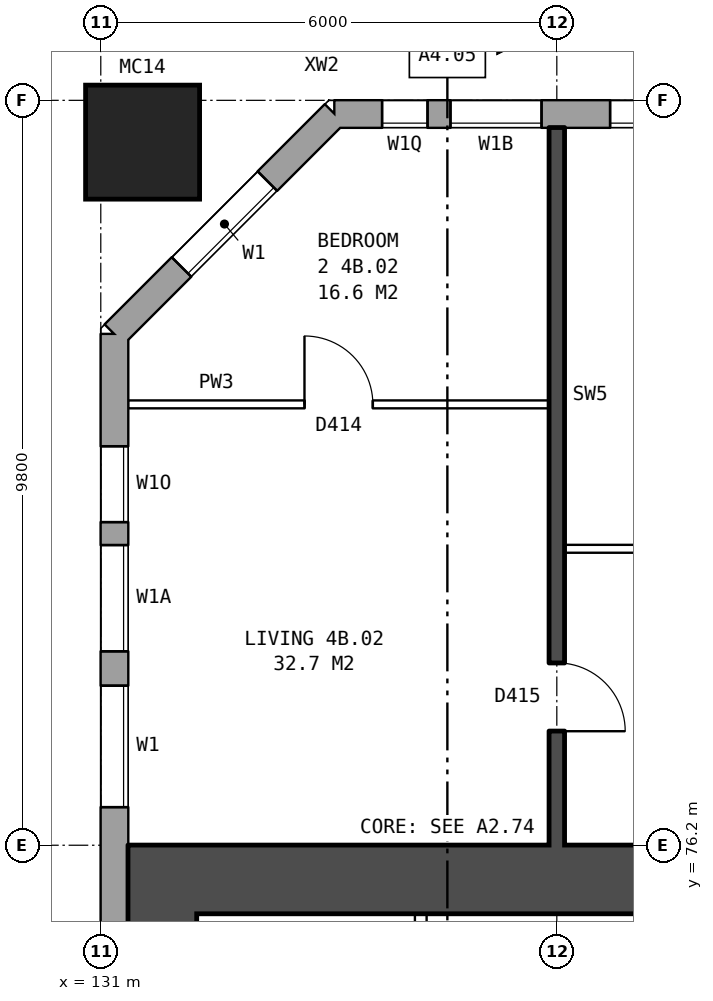
"""IFC4 building model, lengths in metres.
Left out: names, types, materials, properties, quantities, classifications, styles, units other than length and angle.
Written with IfcOpenShell. Run it as: python <this file> out.ifc"""

import sys

from ifc_helpers import new_model, si_unit, direction, frame, frame_2d, origin, origin_2d, place, context, subcontext, project, spatial, rectangle, hollow_rectangle, extrude, element, fill, save


model = new_model("IFC4")
c1 = context("Model", 3, precision=1e-05, world=origin(), true_north=direction((0.0, 1.0)))
c2 = subcontext(c1, "Body", "Model", "MODEL_VIEW")
j1 = project(units=[si_unit("LENGTHUNIT", "METRE"), si_unit("PLANEANGLEUNIT", "RADIAN")], contexts=[c1])
p1 = place(None, origin())
s1 = spatial("IfcSite", under=j1, at=p1, CompositionType="ELEMENT")
p2 = place(p1, origin())
s2 = spatial("IfcBuilding", under=s1, at=p2, CompositionType="ELEMENT")
p3 = place(p2, frame((0.0, 0.0, 19.5)))
s3 = spatial("IfcBuildingStorey", under=s2, at=p3, CompositionType="ELEMENT", Elevation=19.5)
p4 = place(p3, frame((131.55, 85.45, 0.0), z_axis=(0.0, 0.0, 1.0), x_axis=(1.0, 0.0, 0.0)))
e1 = element("IfcColumn", 1, at=p4, inside=s3, PredefinedType="COLUMN", context=c2, shape_type="SweptSolid", body=[
    extrude(hollow_rectangle(XDim=1.5, YDim=1.5, WallThickness=0.08, at=origin_2d()), origin(), (0.0, 0.0, 1.0), 3.1),
])
p5 = place(p3, frame((174.675, 85.82, 0.0), z_axis=(0.0, 0.0, 1.0), x_axis=(-1.0, 0.0, 0.0)))
e2 = element("IfcWall", 2, at=p5, inside=s3, PredefinedType="STANDARD", context=c2, shape_type="SweptSolid", body=[
    extrude(rectangle(XDim=40.601, YDim=0.36, at=frame_2d((20.3, 0.0))), origin(), (0.0, 0.0, 1.0), 2.85),
])
p6 = place(p5, frame((2.375, 0.0, 0.8)))
e3 = element("IfcOpeningElement", 3, at=p6, cuts=e2, PredefinedType="OPENING", context=c2, shape_type="SweptSolid", body=[
    extrude(rectangle(XDim=1.6, YDim=1.8, at=frame_2d((0.8, 0.9))), frame((0.0, 0.19, 0.0), z_axis=(0.0, -1.0, 0.0), x_axis=(1.0, 0.0, 0.0)), (0.0, 0.0, 1.0), 0.38),
])
p7 = place(p5, frame((5.375, 0.0, 0.8)))
e4 = element("IfcOpeningElement", 4, at=p7, cuts=e2, PredefinedType="OPENING", context=c2, shape_type="SweptSolid", body=[
    extrude(rectangle(XDim=1.6, YDim=1.8, at=frame_2d((0.8, 0.9))), frame((0.0, 0.19, 0.0), z_axis=(0.0, -1.0, 0.0), x_axis=(1.0, 0.0, 0.0)), (0.0, 0.0, 1.0), 0.38),
])
p8 = place(p5, frame((8.375, 0.0, 0.8)))
e5 = element("IfcOpeningElement", 5, at=p8, cuts=e2, PredefinedType="OPENING", context=c2, shape_type="SweptSolid", body=[
    extrude(rectangle(XDim=1.6, YDim=1.8, at=frame_2d((0.8, 0.9))), frame((0.0, 0.19, 0.0), z_axis=(0.0, -1.0, 0.0), x_axis=(1.0, 0.0, 0.0)), (0.0, 0.0, 1.0), 0.38),
])
p9 = place(p5, frame((11.375, 0.0, 0.8)))
e6 = element("IfcOpeningElement", 6, at=p9, cuts=e2, PredefinedType="OPENING", context=c2, shape_type="SweptSolid", body=[
    extrude(rectangle(XDim=1.6, YDim=1.8, at=frame_2d((0.8, 0.9))), frame((0.0, 0.19, 0.0), z_axis=(0.0, -1.0, 0.0), x_axis=(1.0, 0.0, 0.0)), (0.0, 0.0, 1.0), 0.38),
])
p10 = place(p5, frame((14.375, 0.0, 0.8)))
e7 = element("IfcOpeningElement", 7, at=p10, cuts=e2, PredefinedType="OPENING", context=c2, shape_type="SweptSolid", body=[
    extrude(rectangle(XDim=1.6, YDim=1.8, at=frame_2d((0.8, 0.9))), frame((0.0, 0.19, 0.0), z_axis=(0.0, -1.0, 0.0), x_axis=(1.0, 0.0, 0.0)), (0.0, 0.0, 1.0), 0.38),
])
p11 = place(p5, frame((17.375, 0.0, 0.8)))
e8 = element("IfcOpeningElement", 8, at=p11, cuts=e2, PredefinedType="OPENING", context=c2, shape_type="SweptSolid", body=[
    extrude(rectangle(XDim=1.6, YDim=1.8, at=frame_2d((0.8, 0.9))), frame((0.0, 0.19, 0.0), z_axis=(0.0, -1.0, 0.0), x_axis=(1.0, 0.0, 0.0)), (0.0, 0.0, 1.0), 0.38),
])
p12 = place(p5, frame((20.375, 0.0, 0.8)))
e9 = element("IfcOpeningElement", 9, at=p12, cuts=e2, PredefinedType="OPENING", context=c2, shape_type="SweptSolid", body=[
    extrude(rectangle(XDim=1.6, YDim=1.8, at=frame_2d((0.8, 0.9))), frame((0.0, 0.19, 0.0), z_axis=(0.0, -1.0, 0.0), x_axis=(1.0, 0.0, 0.0)), (0.0, 0.0, 1.0), 0.38),
])
p13 = place(p5, frame((23.375, 0.0, 0.8)))
e10 = element("IfcOpeningElement", 10, at=p13, cuts=e2, PredefinedType="OPENING", context=c2, shape_type="SweptSolid", body=[
    extrude(rectangle(XDim=1.6, YDim=1.8, at=frame_2d((0.8, 0.9))), frame((0.0, 0.19, 0.0), z_axis=(0.0, -1.0, 0.0), x_axis=(1.0, 0.0, 0.0)), (0.0, 0.0, 1.0), 0.38),
])
p14 = place(p5, frame((26.375, 0.0, 0.8)))
e11 = element("IfcOpeningElement", 11, at=p14, cuts=e2, PredefinedType="OPENING", context=c2, shape_type="SweptSolid", body=[
    extrude(rectangle(XDim=1.6, YDim=1.8, at=frame_2d((0.8, 0.9))), frame((0.0, 0.19, 0.0), z_axis=(0.0, -1.0, 0.0), x_axis=(1.0, 0.0, 0.0)), (0.0, 0.0, 1.0), 0.38),
])
p15 = place(p5, frame((29.375, 0.0, 0.8)))
e12 = element("IfcOpeningElement", 12, at=p15, cuts=e2, PredefinedType="OPENING", context=c2, shape_type="SweptSolid", body=[
    extrude(rectangle(XDim=1.6, YDim=1.8, at=frame_2d((0.8, 0.9))), frame((0.0, 0.19, 0.0), z_axis=(0.0, -1.0, 0.0), x_axis=(1.0, 0.0, 0.0)), (0.0, 0.0, 1.0), 0.38),
])
p16 = place(p5, frame((32.375, 0.0, 0.8)))
e13 = element("IfcOpeningElement", 13, at=p16, cuts=e2, PredefinedType="OPENING", context=c2, shape_type="SweptSolid", body=[
    extrude(rectangle(XDim=1.6, YDim=1.8, at=frame_2d((0.8, 0.9))), frame((0.0, 0.19, 0.0), z_axis=(0.0, -1.0, 0.0), x_axis=(1.0, 0.0, 0.0)), (0.0, 0.0, 1.0), 0.38),
])
p17 = place(p5, frame((35.375, 0.0, 0.8)))
e14 = element("IfcOpeningElement", 14, at=p17, cuts=e2, PredefinedType="OPENING", context=c2, shape_type="SweptSolid", body=[
    extrude(rectangle(XDim=1.6, YDim=1.8, at=frame_2d((0.8, 0.9))), frame((0.0, 0.19, 0.0), z_axis=(0.0, -1.0, 0.0), x_axis=(1.0, 0.0, 0.0)), (0.0, 0.0, 1.0), 0.38),
])
p18 = place(p5, frame((37.875, 0.0, 0.8)))
e15 = element("IfcOpeningElement", 15, at=p18, cuts=e2, PredefinedType="OPENING", context=c2, shape_type="SweptSolid", body=[
    extrude(rectangle(XDim=1.2, YDim=1.8, at=frame_2d((0.6, 0.9))), frame((0.0, 0.19, 0.0), z_axis=(0.0, -1.0, 0.0), x_axis=(1.0, 0.0, 0.0)), (0.0, 0.0, 1.0), 0.38),
])
p19 = place(p5, frame((39.375, 0.0, 0.8)))
e16 = element("IfcOpeningElement", 16, at=p19, cuts=e2, PredefinedType="OPENING", context=c2, shape_type="SweptSolid", body=[
    extrude(rectangle(XDim=0.6, YDim=1.2, at=frame_2d((0.3, 0.6))), frame((0.0, 0.19, 0.0), z_axis=(0.0, -1.0, 0.0), x_axis=(1.0, 0.0, 0.0)), (0.0, 0.0, 1.0), 0.38),
])
p20 = place(p3, frame((134.075, 85.82, 0.0), z_axis=(0.0, 0.0, 1.0), x_axis=(-0.707106781187, -0.707106781187, 0.0)))
e17 = element("IfcWall", 17, at=p20, inside=s3, PredefinedType="STANDARD", context=c2, shape_type="SweptSolid", body=[
    extrude(rectangle(XDim=4.094, YDim=0.36, at=frame_2d((2.047, 0.0))), origin(), (0.0, 0.0, 1.0), 2.85),
])
p21 = place(p20, frame((1.247, 0.0, 0.8)))
e18 = element("IfcOpeningElement", 18, at=p21, cuts=e17, PredefinedType="OPENING", context=c2, shape_type="SweptSolid", body=[
    extrude(rectangle(XDim=1.6, YDim=1.8, at=frame_2d((0.8, 0.9))), frame((0.0, 0.19, 0.0), z_axis=(0.0, -1.0, 0.0), x_axis=(1.0, 0.0, 0.0)), (0.0, 0.0, 1.0), 0.38),
])
p22 = place(p3, frame((131.18, 82.925, 0.0), z_axis=(0.0, 0.0, 1.0), x_axis=(0.0, -1.0, 0.0)))
e19 = element("IfcWall", 19, at=p22, inside=s3, PredefinedType="STANDARD", context=c2, shape_type="SweptSolid", body=[
    extrude(rectangle(XDim=25.851, YDim=0.36, at=frame_2d((12.925, 0.0))), origin(), (0.0, 0.0, 1.0), 2.85),
])
p23 = place(p22, frame((1.475, 0.0, 0.8)))
e20 = element("IfcOpeningElement", 20, at=p23, cuts=e19, PredefinedType="OPENING", context=c2, shape_type="SweptSolid", body=[
    extrude(rectangle(XDim=1.0, YDim=1.2, at=frame_2d((0.5, 0.6))), frame((0.0, 0.19, 0.0), z_axis=(0.0, -1.0, 0.0), x_axis=(1.0, 0.0, 0.0)), (0.0, 0.0, 1.0), 0.38),
])
p24 = place(p22, frame((4.625, 0.0, 0.8)))
e21 = element("IfcOpeningElement", 21, at=p24, cuts=e19, PredefinedType="OPENING", context=c2, shape_type="SweptSolid", body=[
    extrude(rectangle(XDim=1.6, YDim=1.8, at=frame_2d((0.8, 0.9))), frame((0.0, 0.19, 0.0), z_axis=(0.0, -1.0, 0.0), x_axis=(1.0, 0.0, 0.0)), (0.0, 0.0, 1.0), 0.38),
])
p25 = place(p22, frame((19.625, 0.0, 0.8)))
e22 = element("IfcOpeningElement", 22, at=p25, cuts=e19, PredefinedType="OPENING", context=c2, shape_type="SweptSolid", body=[
    extrude(rectangle(XDim=1.6, YDim=1.8, at=frame_2d((0.8, 0.9))), frame((0.0, 0.19, 0.0), z_axis=(0.0, -1.0, 0.0), x_axis=(1.0, 0.0, 0.0)), (0.0, 0.0, 1.0), 0.38),
])
p26 = place(p22, frame((21.525, 0.0, 0.8)))
e23 = element("IfcOpeningElement", 23, at=p26, cuts=e19, PredefinedType="OPENING", context=c2, shape_type="SweptSolid", body=[
    extrude(rectangle(XDim=1.4, YDim=1.8, at=frame_2d((0.7, 0.9))), frame((0.0, 0.19, 0.0), z_axis=(0.0, -1.0, 0.0), x_axis=(1.0, 0.0, 0.0)), (0.0, 0.0, 1.0), 0.38),
])
p27 = place(p22, frame((2.775, 0.0, 0.8)))
e24 = element("IfcOpeningElement", 24, at=p27, cuts=e19, PredefinedType="OPENING", context=c2, shape_type="SweptSolid", body=[
    extrude(rectangle(XDim=1.4, YDim=1.8, at=frame_2d((0.7, 0.9))), frame((0.0, 0.19, 0.0), z_axis=(0.0, -1.0, 0.0), x_axis=(1.0, 0.0, 0.0)), (0.0, 0.0, 1.0), 0.38),
])
p28 = place(p22, frame((23.225, 0.0, 0.8)))
e25 = element("IfcOpeningElement", 25, at=p28, cuts=e19, PredefinedType="OPENING", context=c2, shape_type="SweptSolid", body=[
    extrude(rectangle(XDim=1.0, YDim=1.2, at=frame_2d((0.5, 0.6))), frame((0.0, 0.19, 0.0), z_axis=(0.0, -1.0, 0.0), x_axis=(1.0, 0.0, 0.0)), (0.0, 0.0, 1.0), 0.38),
])
p29 = place(p3, frame((131.81, 64.7, 0.0), z_axis=(0.0, 0.0, 1.0), x_axis=(0.0, 1.0, 0.0)))
e26 = element("IfcWall", 26, at=p29, inside=s3, PredefinedType="SHEAR", context=c2, shape_type="SweptSolid", body=[
    extrude(rectangle(XDim=10.6, YDim=0.9, at=frame_2d((5.3, 0.0))), origin(), (0.0, 0.0, 1.0), 2.85),
])
p30 = place(p3, frame((139.76, 75.75, 0.0), z_axis=(0.0, 0.0, 1.0), x_axis=(-1.0, 0.0, 0.0)))
e27 = element("IfcWall", 27, at=p30, inside=s3, PredefinedType="SHEAR", context=c2, shape_type="SweptSolid", body=[
    extrude(rectangle(XDim=8.4, YDim=0.9, at=frame_2d((4.2, 0.0))), origin(), (0.0, 0.0, 1.0), 2.85),
])
p31 = place(p3, frame((135.21, 71.45, 0.0), z_axis=(0.0, 0.0, 1.0), x_axis=(0.0, 1.0, 0.0)))
e28 = element("IfcWall", 28, at=p31, inside=s3, PredefinedType="PARTITIONING", context=c2, shape_type="SweptSolid", body=[
    extrude(rectangle(XDim=3.85, YDim=0.15, at=frame_2d((1.925, 0.0))), origin(), (0.0, 0.0, 1.0), 2.85),
])
p32 = place(p31, frame((0.45, 0.0, 0.0)))
e29 = element("IfcOpeningElement", 29, at=p32, cuts=e28, PredefinedType="OPENING", context=c2, shape_type="SweptSolid", body=[
    extrude(rectangle(XDim=1.1, YDim=2.1, at=frame_2d((0.55, 1.05))), frame((0.0, 0.085, 0.0), z_axis=(0.0, -1.0, 0.0), x_axis=(1.0, 0.0, 0.0)), (0.0, 0.0, 1.0), 0.17),
])
p33 = place(p3, frame((137.1, 80.1, 0.0), z_axis=(0.0, 0.0, 1.0), x_axis=(1.0, 0.0, 0.0)))
e30 = element("IfcWall", 30, at=p33, inside=s3, PredefinedType="PARTITIONING", context=c2, shape_type="SweptSolid", body=[
    extrude(rectangle(XDim=5.8, YDim=0.1, at=frame_2d((2.9, 0.0))), origin(), (0.0, 0.0, 1.0), 2.85),
])
p34 = place(p33, frame((1.3, 0.0, 0.0)))
e31 = element("IfcOpeningElement", 31, at=p34, cuts=e30, PredefinedType="OPENING", context=c2, shape_type="SweptSolid", body=[
    extrude(rectangle(XDim=0.9, YDim=2.1, at=frame_2d((0.45, 1.05))), frame((0.0, 0.06, 0.0), z_axis=(0.0, -1.0, 0.0), x_axis=(1.0, 0.0, 0.0)), (0.0, 0.0, 1.0), 0.12),
])
p35 = place(p33, frame((4.2, 0.0, 0.0)))
e32 = element("IfcOpeningElement", 32, at=p35, cuts=e30, PredefinedType="OPENING", context=c2, shape_type="SweptSolid", body=[
    extrude(rectangle(XDim=0.9, YDim=2.1, at=frame_2d((0.45, 1.05))), frame((0.0, 0.06, 0.0), z_axis=(0.0, -1.0, 0.0), x_axis=(1.0, 0.0, 0.0)), (0.0, 0.0, 1.0), 0.12),
])
p36 = place(p3, frame((131.36, 82.0, 0.0), z_axis=(0.0, 0.0, 1.0), x_axis=(1.0, 0.0, 0.0)))
e33 = element("IfcWall", 33, at=p36, inside=s3, PredefinedType="PARTITIONING", context=c2, shape_type="SweptSolid", body=[
    extrude(rectangle(XDim=5.54, YDim=0.1, at=frame_2d((2.77, 0.0))), origin(), (0.0, 0.0, 1.0), 2.85),
])
p37 = place(p36, frame((2.32, 0.0, 0.0)))
e34 = element("IfcOpeningElement", 34, at=p37, cuts=e33, PredefinedType="OPENING", context=c2, shape_type="SweptSolid", body=[
    extrude(rectangle(XDim=0.9, YDim=2.1, at=frame_2d((0.45, 1.05))), frame((0.0, 0.06, 0.0), z_axis=(0.0, -1.0, 0.0), x_axis=(1.0, 0.0, 0.0)), (0.0, 0.0, 1.0), 0.12),
])
p38 = place(p3, frame((137.0, 76.2, 0.0), z_axis=(0.0, 0.0, 1.0), x_axis=(0.0, 1.0, 0.0)))
e35 = element("IfcWall", 35, at=p38, inside=s3, PredefinedType="SOLIDWALL", context=c2, shape_type="SweptSolid", body=[
    extrude(rectangle(XDim=9.44, YDim=0.2, at=frame_2d((4.72, 0.0))), origin(), (0.0, 0.0, 1.0), 2.85),
])
p39 = place(p38, frame((1.5, 0.0, 0.0)))
e36 = element("IfcOpeningElement", 36, at=p39, cuts=e35, PredefinedType="OPENING", context=c2, shape_type="SweptSolid", body=[
    extrude(rectangle(XDim=0.9, YDim=2.1, at=frame_2d((0.45, 1.05))), frame((0.0, 0.11, 0.0), z_axis=(0.0, -1.0, 0.0), x_axis=(1.0, 0.0, 0.0)), (0.0, 0.0, 1.0), 0.22),
])
p40 = place(p17, origin())
e37 = element("IfcWindow", 37, at=p40, inside=s3, PartitioningType="SINGLE_PANEL", PredefinedType="WINDOW", context=c2, shape_type="SweptSolid", body=[
    extrude(rectangle(XDim=1.6, YDim=1.8, at=frame_2d((0.8, 0.9))), frame((0.0, 0.15, 0.0), z_axis=(0.0, -1.0, 0.0), x_axis=(1.0, 0.0, 0.0)), (0.0, 0.0, 1.0), 0.06),
])
fill(e14, e37)
p41 = place(p18, origin())
e38 = element("IfcWindow", 38, at=p41, inside=s3, PartitioningType="SINGLE_PANEL", PredefinedType="WINDOW", context=c2, shape_type="SweptSolid", body=[
    extrude(rectangle(XDim=1.2, YDim=1.8, at=frame_2d((0.6, 0.9))), frame((0.0, 0.15, 0.0), z_axis=(0.0, -1.0, 0.0), x_axis=(1.0, 0.0, 0.0)), (0.0, 0.0, 1.0), 0.06),
])
fill(e15, e38)
p42 = place(p21, origin())
e39 = element("IfcWindow", 39, at=p42, inside=s3, PartitioningType="SINGLE_PANEL", PredefinedType="WINDOW", context=c2, shape_type="SweptSolid", body=[
    extrude(rectangle(XDim=1.6, YDim=1.8, at=frame_2d((0.8, 0.9))), frame((0.0, 0.15, 0.0), z_axis=(0.0, -1.0, 0.0), x_axis=(1.0, 0.0, 0.0)), (0.0, 0.0, 1.0), 0.06),
])
fill(e18, e39)
p43 = place(p23, origin())
e40 = element("IfcWindow", 40, at=p43, inside=s3, PartitioningType="SINGLE_PANEL", PredefinedType="WINDOW", context=c2, shape_type="SweptSolid", body=[
    extrude(rectangle(XDim=1.0, YDim=1.2, at=frame_2d((0.5, 0.6))), frame((0.0, 0.15, 0.0), z_axis=(0.0, -1.0, 0.0), x_axis=(1.0, 0.0, 0.0)), (0.0, 0.0, 1.0), 0.06),
])
fill(e20, e40)
p44 = place(p24, origin())
e41 = element("IfcWindow", 41, at=p44, inside=s3, PartitioningType="SINGLE_PANEL", PredefinedType="WINDOW", context=c2, shape_type="SweptSolid", body=[
    extrude(rectangle(XDim=1.6, YDim=1.8, at=frame_2d((0.8, 0.9))), frame((0.0, 0.15, 0.0), z_axis=(0.0, -1.0, 0.0), x_axis=(1.0, 0.0, 0.0)), (0.0, 0.0, 1.0), 0.06),
])
fill(e21, e41)
p45 = place(p37, origin())
e42 = element("IfcDoor", 42, at=p45, inside=s3, OperationType="SINGLE_SWING_LEFT", PredefinedType="DOOR", context=c2, shape_type="SweptSolid", body=[
    extrude(rectangle(XDim=0.9, YDim=2.1, at=frame_2d((0.45, 1.05))), frame((0.0, 0.025, 0.0), z_axis=(0.0, -1.0, 0.0), x_axis=(1.0, 0.0, 0.0)), (0.0, 0.0, 1.0), 0.05),
])
fill(e34, e42)
p46 = place(p39, frame((0.9, 0.0, 0.0), z_axis=(0.0, 0.0, 1.0), x_axis=(-1.0, 0.0, 0.0)))
e43 = element("IfcDoor", 43, at=p46, inside=s3, OperationType="SINGLE_SWING_RIGHT", PredefinedType="DOOR", context=c2, shape_type="SweptSolid", body=[
    extrude(rectangle(XDim=0.9, YDim=2.1, at=frame_2d((0.45, 1.05))), frame((0.0, 0.025, 0.0), z_axis=(0.0, -1.0, 0.0), x_axis=(1.0, 0.0, 0.0)), (0.0, 0.0, 1.0), 0.05),
])
fill(e36, e43)
p47 = place(p19, origin())
e44 = element("IfcWindow", 44, at=p47, inside=s3, PartitioningType="SINGLE_PANEL", PredefinedType="WINDOW", context=c2, shape_type="SweptSolid", body=[
    extrude(rectangle(XDim=0.6, YDim=1.2, at=frame_2d((0.3, 0.6))), frame((0.0, 0.15, 0.0), z_axis=(0.0, -1.0, 0.0), x_axis=(1.0, 0.0, 0.0)), (0.0, 0.0, 1.0), 0.06),
])
fill(e16, e44)
p48 = place(p27, origin())
e45 = element("IfcWindow", 45, at=p48, inside=s3, PartitioningType="SINGLE_PANEL", PredefinedType="WINDOW", context=c2, shape_type="SweptSolid", body=[
    extrude(rectangle(XDim=1.4, YDim=1.8, at=frame_2d((0.7, 0.9))), frame((0.0, 0.15, 0.0), z_axis=(0.0, -1.0, 0.0), x_axis=(1.0, 0.0, 0.0)), (0.0, 0.0, 1.0), 0.06),
])
fill(e24, e45)
save(model, sys.argv[1])
